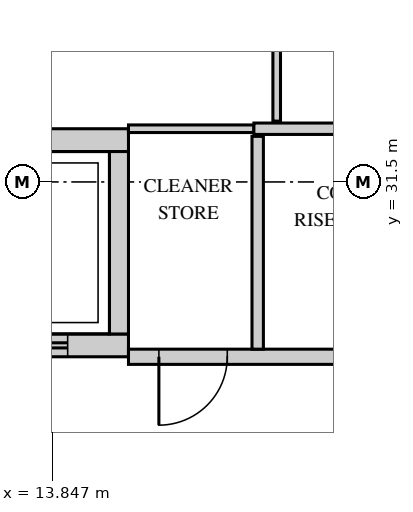
"""IFC4 building model, lengths in metres.
Left out: names, types, materials, properties, quantities, classifications, styles, units other than length and angle.
Written with IfcOpenShell. Run it as: python <this file> out.ifc"""

import sys

from ifc_helpers import new_model, si_unit, direction, frame, frame_2d, origin, place, context, subcontext, project, spatial, rectangle, extrude, source, transform, mapped, element, fill, save


model = new_model("IFC4")
c1 = context("Model", 3, precision=1e-05, world=origin(), true_north=direction((0.0, 1.0)))
c2 = subcontext(c1, "Body", "Model", "MODEL_VIEW")
j1 = project(units=[si_unit("LENGTHUNIT", "METRE"), si_unit("PLANEANGLEUNIT", "RADIAN")], contexts=[c1])
p1 = place(None, origin())
s1 = spatial("IfcSite", under=j1, at=p1, CompositionType="ELEMENT")
p2 = place(p1, origin())
s2 = spatial("IfcBuilding", under=s1, at=p2, CompositionType="ELEMENT")
p3 = place(p2, frame((0.0, 0.0, 266.2)))
s3 = spatial("IfcBuildingStorey", under=s2, at=p3, CompositionType="ELEMENT", Elevation=266.2)
m1 = source(origin(), c2, "Body", "SweptSolid", [
    extrude(rectangle(XDim=8.15, YDim=0.3, at=frame_2d((4.075, 0.0))), origin(), (0.0, 0.0, 1.0), 3.75),
])
p4 = place(p3, frame((6.7, 32.05, 0.0), z_axis=(0.0, 0.0, 1.0), x_axis=(1.0, 0.0, 0.0)))
e1 = element("IfcWall", 1, at=p4, inside=s3, PredefinedType="STANDARD", context=c2, shape_type="MappedRepresentation", body=[
    mapped(m1, transform((0.0, 0.0, 0.0))),
])
p5 = place(p3, frame((6.7, 29.35, 0.0), z_axis=(0.0, 0.0, 1.0), x_axis=(1.0, 0.0, 0.0)))
e2 = element("IfcWall", 2, at=p5, inside=s3, PredefinedType="STANDARD", context=c2, shape_type="MappedRepresentation", body=[
    mapped(m1, transform((0.0, 0.0, 0.0))),
])
m2 = source(origin(), c2, "Body", "SweptSolid", [
    extrude(rectangle(XDim=1.2, YDim=2.1, at=frame_2d((0.6, 1.05))), frame((0.0, 0.16, 0.0), z_axis=(0.0, -1.0, 0.0), x_axis=(1.0, 0.0, 0.0)), (0.0, 0.0, 1.0), 0.32),
])
p6 = place(p5, frame((1.05, 0.0, 0.0)))
e3 = element("IfcOpeningElement", 3, at=p6, cuts=e2, PredefinedType="OPENING", context=c2, shape_type="MappedRepresentation", body=[
    mapped(m2, transform((0.0, 0.0, 0.0))),
])
p7 = place(p5, frame((3.6, 0.0, 0.0)))
e4 = element("IfcOpeningElement", 4, at=p7, cuts=e2, PredefinedType="OPENING", context=c2, shape_type="MappedRepresentation", body=[
    mapped(m2, transform((0.0, 0.0, 0.0))),
])
p8 = place(p5, frame((6.15, 0.0, 0.0)))
e5 = element("IfcOpeningElement", 5, at=p8, cuts=e2, PredefinedType="OPENING", context=c2, shape_type="MappedRepresentation", body=[
    mapped(m2, transform((0.0, 0.0, 0.0))),
])
m3 = source(origin(), c2, "Body", "SweptSolid", [
    extrude(rectangle(XDim=2.4, YDim=0.25, at=frame_2d((1.2, 0.0))), origin(), (0.0, 0.0, 1.0), 3.75),
])
p9 = place(p3, frame((14.725, 29.5, 0.0), z_axis=(0.0, 0.0, 1.0), x_axis=(0.0, 1.0, 0.0)))
e6 = element("IfcWall", 6, at=p9, inside=s3, PredefinedType="STANDARD", context=c2, shape_type="MappedRepresentation", body=[
    mapped(m3, transform((0.0, 0.0, 0.0))),
])
m4 = source(origin(), c2, "Body", "SweptSolid", [
    extrude(rectangle(XDim=4.85, YDim=0.2, at=frame_2d((2.425, 0.0))), origin(), (0.0, 0.0, 1.0), 3.8),
])
p10 = place(p3, frame((14.85, 29.2, 0.0), z_axis=(0.0, 0.0, 1.0), x_axis=(1.0, 0.0, 0.0)))
e7 = element("IfcWall", 7, at=p10, inside=s3, PredefinedType="PARTITIONING", context=c2, shape_type="MappedRepresentation", body=[
    mapped(m4, transform((0.0, 0.0, 0.0))),
])
m5 = source(origin(), c2, "Body", "SweptSolid", [
    extrude(rectangle(XDim=0.9, YDim=2.1, at=frame_2d((0.45, 1.05))), frame((0.0, 0.11, 0.0), z_axis=(0.0, -1.0, 0.0), x_axis=(1.0, 0.0, 0.0)), (0.0, 0.0, 1.0), 0.22),
])
p11 = place(p10, frame((0.4, 0.0, 0.0)))
e8 = element("IfcOpeningElement", 8, at=p11, cuts=e7, PredefinedType="OPENING", context=c2, shape_type="MappedRepresentation", body=[
    mapped(m5, transform((0.0, 0.0, 0.0))),
])
p12 = place(p10, frame((2.85, 0.0, 0.0)))
e9 = element("IfcOpeningElement", 9, at=p12, cuts=e7, PredefinedType="OPENING", context=c2, shape_type="MappedRepresentation", body=[
    mapped(m5, transform((0.0, 0.0, 0.0))),
])
m6 = source(origin(), c2, "Body", "SweptSolid", [
    extrude(rectangle(XDim=2.8, YDim=0.15, at=frame_2d((1.4, 0.0))), origin(), (0.0, 0.0, 1.0), 3.8),
])
p13 = place(p3, frame((16.55, 29.3, 0.0), z_axis=(0.0, 0.0, 1.0), x_axis=(0.0, 1.0, 0.0)))
e10 = element("IfcWall", 10, at=p13, inside=s3, PredefinedType="PARTITIONING", context=c2, shape_type="MappedRepresentation", body=[
    mapped(m6, transform((0.0, 0.0, 0.0))),
])
m7 = source(origin(), c2, "Body", "SweptSolid", [
    extrude(rectangle(XDim=1.65, YDim=0.1, at=frame_2d((0.825, 0.0))), origin(), (0.0, 0.0, 1.0), 3.8),
])
p14 = place(p3, frame((14.85, 32.2, 0.0), z_axis=(0.0, 0.0, 1.0), x_axis=(1.0, 0.0, 0.0)))
e11 = element("IfcWall", 11, at=p14, inside=s3, PredefinedType="PARTITIONING", context=c2, shape_type="MappedRepresentation", body=[
    mapped(m7, transform((0.0, 0.0, 0.0))),
])
m8 = source(origin(), c2, "Body", "SweptSolid", [
    extrude(rectangle(XDim=3.2, YDim=0.15, at=frame_2d((1.6, 0.0))), origin(), (0.0, 0.0, 1.0), 3.8),
])
p15 = place(p3, frame((16.5, 32.2, 0.0), z_axis=(0.0, 0.0, 1.0), x_axis=(1.0, 0.0, 0.0)))
e12 = element("IfcWall", 12, at=p15, inside=s3, PredefinedType="PARTITIONING", context=c2, shape_type="MappedRepresentation", body=[
    mapped(m8, transform((0.0, 0.0, 0.0))),
])
m9 = source(origin(), c2, "Body", "SweptSolid", [
    extrude(rectangle(XDim=5.9, YDim=0.1, at=frame_2d((2.95, 0.0))), origin(), (0.0, 0.0, 1.0), 3.8),
])
p16 = place(p3, frame((16.8, 32.3, 0.0), z_axis=(0.0, 0.0, 1.0), x_axis=(0.0, 1.0, 0.0)))
e13 = element("IfcWall", 13, at=p16, inside=s3, PredefinedType="PARTITIONING", context=c2, shape_type="MappedRepresentation", body=[
    mapped(m9, transform((0.0, 0.0, 0.0))),
])
m10 = source(origin(), c2, "Body", "SweptSolid", [
    extrude(rectangle(XDim=0.9, YDim=2.1, at=frame_2d((0.45, 1.05))), frame((0.0, 0.025, 0.0), z_axis=(0.0, -1.0, 0.0), x_axis=(1.0, 0.0, 0.0)), (0.0, 0.0, 1.0), 0.05),
])
p17 = place(p11, origin())
e14 = element("IfcDoor", 14, at=p17, inside=s3, OperationType="SINGLE_SWING_LEFT", PredefinedType="DOOR", context=c2, shape_type="MappedRepresentation", body=[
    mapped(m10, transform((0.0, 0.0, 0.0))),
])
fill(e8, e14)
m11 = source(origin(), c2, "Body", "SweptSolid", [
    extrude(rectangle(XDim=1.2, YDim=2.1, at=frame_2d((0.6, 1.05))), frame((0.0, 0.025, 0.0), z_axis=(0.0, -1.0, 0.0), x_axis=(1.0, 0.0, 0.0)), (0.0, 0.0, 1.0), 0.05),
])
p18 = place(p8, origin())
e15 = element("IfcDoor", 15, at=p18, inside=s3, OperationType="DOUBLE_DOOR_SLIDING", PredefinedType="DOOR", context=c2, shape_type="MappedRepresentation", body=[
    mapped(m11, transform((0.0, 0.0, 0.0))),
])
fill(e5, e15)
save(model, sys.argv[1])
